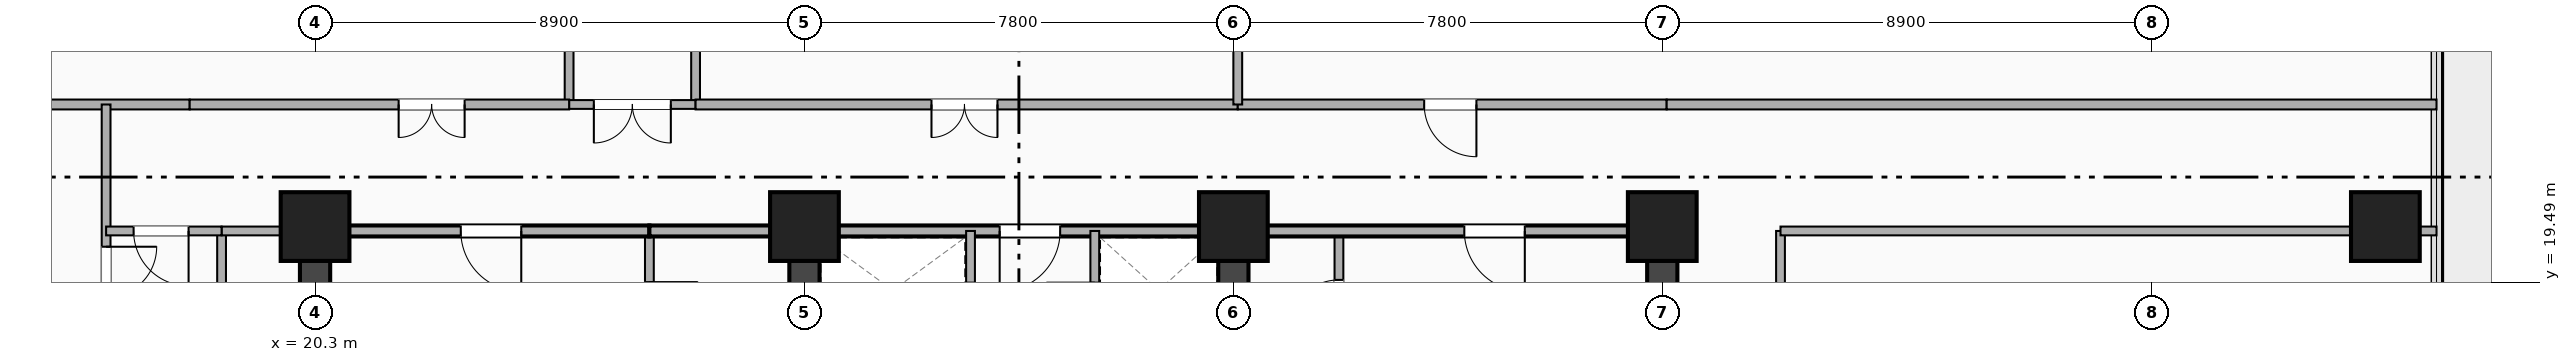
"""IFC4 building model, lengths in metres.
Left out: names, types, materials, properties, quantities, classifications, styles, units other than length and angle.
Written with IfcOpenShell. Run it as: python <this file> out.ifc"""

import sys

from ifc_helpers import new_model, si_unit, direction, frame, frame_2d, origin, origin_2d, place, context, subcontext, project, spatial, rectangle, extrude, element, fill, save


model = new_model("IFC4")
c1 = context("Model", 3, precision=1e-05, world=origin(), true_north=direction((0.0, 1.0)))
c2 = subcontext(c1, "Body", "Model", "MODEL_VIEW")
j1 = project(units=[si_unit("LENGTHUNIT", "METRE"), si_unit("PLANEANGLEUNIT", "RADIAN")], contexts=[c1])
p1 = place(None, origin())
s1 = spatial("IfcSite", under=j1, at=p1, CompositionType="ELEMENT")
p2 = place(p1, origin())
s2 = spatial("IfcBuilding", under=s1, at=p2, CompositionType="ELEMENT")
p3 = place(p2, frame((0.0, 0.0, 83.8)))
s3 = spatial("IfcBuildingStorey", under=s2, at=p3, CompositionType="ELEMENT", Elevation=83.8)
for number, where, z_axis, x_axis in (
    (1, (20.3, 3.5, 0.0), (0.0, 0.0, 1.0), (0.0, 1.0, 0.0)),
    (2, (44.8, 3.5, 0.0), (0.0, 0.0, 1.0), (0.0, 1.0, 0.0)),
):
    element("IfcWall", number, at=place(p3, frame(where, z_axis=z_axis, x_axis=x_axis)), inside=s3, PredefinedType="SHEAR", context=c2, shape_type="SweptSolid", body=[
        extrude(rectangle(XDim=16.9, YDim=0.55, at=frame_2d((8.45, 0.0))), origin(), (0.0, 0.0, 1.0), 4.14),
    ])
p4 = place(p3, frame((29.2, 3.5, 0.0), z_axis=(0.0, 0.0, 1.0), x_axis=(0.0, 1.0, 0.0)))
e3 = element("IfcWall", 3, at=p4, inside=s3, PredefinedType="SHEAR", context=c2, shape_type="SweptSolid", body=[
    extrude(rectangle(XDim=16.9, YDim=0.55, at=frame_2d((8.45, 0.0))), origin(), (0.0, 0.0, 1.0), 4.14),
])
p5 = place(p4, frame((7.75, 0.0, 0.0), z_axis=(0.0, 0.0, 1.0), x_axis=(-1.0, 0.0, 0.0)))
e4 = element("IfcOpeningElement", 4, at=p5, cuts=e3, PredefinedType="OPENING", context=c2, shape_type="SweptSolid", body=[
    extrude(rectangle(XDim=1.1, YDim=2.15, at=frame_2d((0.55, 1.075))), frame((0.0, 0.285, 0.0), z_axis=(0.0, -1.0, 0.0), x_axis=(1.0, 0.0, 0.0)), (0.0, 0.0, 1.0), 0.57),
])
p6 = place(p3, frame((37.0, 3.5, 0.0), z_axis=(0.0, 0.0, 1.0), x_axis=(0.0, 1.0, 0.0)))
e5 = element("IfcWall", 5, at=p6, inside=s3, PredefinedType="SHEAR", context=c2, shape_type="SweptSolid", body=[
    extrude(rectangle(XDim=16.9, YDim=0.55, at=frame_2d((8.45, 0.0))), origin(), (0.0, 0.0, 1.0), 4.14),
])
p7 = place(p6, frame((6.65, 0.0, 0.0)))
e6 = element("IfcOpeningElement", 6, at=p7, cuts=e5, PredefinedType="OPENING", context=c2, shape_type="SweptSolid", body=[
    extrude(rectangle(XDim=1.1, YDim=2.15, at=frame_2d((0.55, 1.075))), frame((0.0, 0.285, 0.0), z_axis=(0.0, -1.0, 0.0), x_axis=(1.0, 0.0, 0.0)), (0.0, 0.0, 1.0), 0.57),
])
for number, where, z_axis, x_axis in (
    (7, (20.3, 20.5, -0.26), (0.0, 0.0, 1.0), (1.0, 0.0, 0.0)),
    (8, (29.2, 20.5, -0.26), (0.0, 0.0, 1.0), (1.0, 0.0, 0.0)),
    (9, (37.0, 20.5, -0.26), (0.0, 0.0, 1.0), (1.0, 0.0, 0.0)),
    (10, (44.8, 20.5, -0.26), (0.0, 0.0, 1.0), (1.0, 0.0, 0.0)),
    (11, (57.95, 20.5, -0.26), (0.0, 0.0, 1.0), (1.0, 0.0, 0.0)),
):
    element("IfcColumn", number, at=place(p3, frame(where, z_axis=z_axis, x_axis=x_axis)), inside=s3, PredefinedType="COLUMN", context=c2, shape_type="SweptSolid", body=[
        extrude(rectangle(XDim=1.25, YDim=1.25, at=origin_2d()), origin(), (0.0, 0.0, 1.0), 4.4),
    ])
p8 = place(p3, frame((26.38, 17.76, 0.0), z_axis=(0.0, 0.0, 1.0), x_axis=(0.0, 1.0, 0.0)))
e12 = element("IfcWall", 12, at=p8, inside=s3, PredefinedType="PARTITIONING", context=c2, shape_type="SweptSolid", body=[
    extrude(rectangle(XDim=2.66, YDim=0.16, at=frame_2d((1.33, 0.0))), origin(), (0.0, 0.0, 1.0), 3.514),
])
p9 = place(p8, frame((0.85, 0.0, 0.0)))
e13 = element("IfcOpeningElement", 13, at=p9, cuts=e12, PredefinedType="OPENING", context=c2, shape_type="SweptSolid", body=[
    extrude(rectangle(XDim=0.88, YDim=2.08, at=frame_2d((0.44, 1.04))), frame((0.0, 0.09, 0.0), z_axis=(0.0, -1.0, 0.0), x_axis=(1.0, 0.0, 0.0)), (0.0, 0.0, 1.0), 0.18),
])
p10 = place(p3, frame((38.92, 17.76, 0.0), z_axis=(0.0, 0.0, 1.0), x_axis=(0.0, 1.0, 0.0)))
e14 = element("IfcWall", 14, at=p10, inside=s3, PredefinedType="PARTITIONING", context=c2, shape_type="SweptSolid", body=[
    extrude(rectangle(XDim=2.66, YDim=0.16, at=frame_2d((1.33, 0.0))), origin(), (0.0, 0.0, 1.0), 3.514),
])
p11 = place(p10, frame((1.77, 0.0, 0.0), z_axis=(0.0, 0.0, 1.0), x_axis=(-1.0, 0.0, 0.0)))
e15 = element("IfcOpeningElement", 15, at=p11, cuts=e14, PredefinedType="OPENING", context=c2, shape_type="SweptSolid", body=[
    extrude(rectangle(XDim=0.92, YDim=2.08, at=frame_2d((0.46, 1.04))), frame((0.0, 0.09, 0.0), z_axis=(0.0, -1.0, 0.0), x_axis=(1.0, 0.0, 0.0)), (0.0, 0.0, 1.0), 0.18),
])
p12 = place(p3, frame((20.65, 20.42, 0.0), z_axis=(0.0, 0.0, 1.0), x_axis=(1.0, 0.0, 0.0)))
e16 = element("IfcWall", 16, at=p12, inside=s3, PredefinedType="PARTITIONING", context=c2, shape_type="SweptSolid", body=[
    extrude(rectangle(XDim=5.73, YDim=0.2, at=frame_2d((2.865, 0.0))), origin(), (0.0, 0.0, 1.0), 3.213),
])
p13 = place(p12, frame((2.3, 0.0, 0.0)))
e17 = element("IfcOpeningElement", 17, at=p13, cuts=e16, PredefinedType="OPENING", context=c2, shape_type="SweptSolid", body=[
    extrude(rectangle(XDim=1.1, YDim=2.15, at=frame_2d((0.55, 1.075))), frame((0.0, 0.11, 0.0), z_axis=(0.0, -1.0, 0.0), x_axis=(1.0, 0.0, 0.0)), (0.0, 0.0, 1.0), 0.22),
])
p14 = place(p3, frame((26.38, 20.42, 0.0), z_axis=(0.0, 0.0, 1.0), x_axis=(1.0, 0.0, 0.0)))
e18 = element("IfcWall", 18, at=p14, inside=s3, PredefinedType="PARTITIONING", context=c2, shape_type="SweptSolid", body=[
    extrude(rectangle(XDim=2.82, YDim=0.2, at=frame_2d((1.41, 0.0))), origin(), (0.0, 0.0, 1.0), 3.213),
])
p15 = place(p3, frame((29.2, 20.42, 0.0), z_axis=(0.0, 0.0, 1.0), x_axis=(1.0, 0.0, 0.0)))
e19 = element("IfcWall", 19, at=p15, inside=s3, PredefinedType="PARTITIONING", context=c2, shape_type="SweptSolid", body=[
    extrude(rectangle(XDim=7.8, YDim=0.2, at=frame_2d((3.9, 0.0))), origin(), (0.0, 0.0, 1.0), 3.213),
])
p16 = place(p15, frame((3.55, 0.0, 0.0)))
e20 = element("IfcOpeningElement", 20, at=p16, cuts=e19, PredefinedType="OPENING", context=c2, shape_type="SweptSolid", body=[
    extrude(rectangle(XDim=1.1, YDim=2.15, at=frame_2d((0.55, 1.075))), frame((0.0, 0.11, 0.0), z_axis=(0.0, -1.0, 0.0), x_axis=(1.0, 0.0, 0.0)), (0.0, 0.0, 1.0), 0.22),
])
p17 = place(p3, frame((37.0, 20.42, 0.0), z_axis=(0.0, 0.0, 1.0), x_axis=(1.0, 0.0, 0.0)))
e21 = element("IfcWall", 21, at=p17, inside=s3, PredefinedType="PARTITIONING", context=c2, shape_type="SweptSolid", body=[
    extrude(rectangle(XDim=7.45, YDim=0.2, at=frame_2d((3.725, 0.0))), origin(), (0.0, 0.0, 1.0), 3.213),
])
p18 = place(p17, frame((4.2, 0.0, 0.0)))
e22 = element("IfcOpeningElement", 22, at=p18, cuts=e21, PredefinedType="OPENING", context=c2, shape_type="SweptSolid", body=[
    extrude(rectangle(XDim=1.1, YDim=2.15, at=frame_2d((0.55, 1.075))), frame((0.0, 0.11, 0.0), z_axis=(0.0, -1.0, 0.0), x_axis=(1.0, 0.0, 0.0)), (0.0, 0.0, 1.0), 0.22),
])
p19 = place(p3, frame((32.22, 12.5, 0.0), z_axis=(0.0, 0.0, 1.0), x_axis=(0.0, 1.0, 0.0)))
e23 = element("IfcWall", 23, at=p19, inside=s3, PredefinedType="PARTITIONING", context=c2, shape_type="SweptSolid", body=[
    extrude(rectangle(XDim=7.92, YDim=0.16, at=frame_2d((3.96, 0.0))), origin(), (0.0, 0.0, 1.0), 3.514),
])
p20 = place(p19, frame((1.43, 0.0, 0.0), z_axis=(0.0, 0.0, 1.0), x_axis=(-1.0, 0.0, 0.0)))
e24 = element("IfcOpeningElement", 24, at=p20, cuts=e23, PredefinedType="OPENING", context=c2, shape_type="SweptSolid", body=[
    extrude(rectangle(XDim=1.08, YDim=2.16, at=frame_2d((0.54, 1.08))), frame((0.0, 0.09, 0.0), z_axis=(0.0, -1.0, 0.0), x_axis=(1.0, 0.0, 0.0)), (0.0, 0.0, 1.0), 0.18),
])
p21 = place(p19, frame((4.33, 0.0, 0.0), z_axis=(0.0, 0.0, 1.0), x_axis=(-1.0, 0.0, 0.0)))
e25 = element("IfcOpeningElement", 25, at=p21, cuts=e23, PredefinedType="OPENING", context=c2, shape_type="SweptSolid", body=[
    extrude(rectangle(XDim=1.08, YDim=2.16, at=frame_2d((0.54, 1.08))), frame((0.0, 0.09, 0.0), z_axis=(0.0, -1.0, 0.0), x_axis=(1.0, 0.0, 0.0)), (0.0, 0.0, 1.0), 0.18),
])
p22 = place(p19, frame((6.1, 0.0, 0.0)))
e26 = element("IfcOpeningElement", 26, at=p22, cuts=e23, PredefinedType="OPENING", context=c2, shape_type="SweptSolid", body=[
    extrude(rectangle(XDim=0.88, YDim=2.08, at=frame_2d((0.44, 1.04))), frame((0.0, 0.09, 0.0), z_axis=(0.0, -1.0, 0.0), x_axis=(1.0, 0.0, 0.0)), (0.0, 0.0, 1.0), 0.18),
])
p23 = place(p3, frame((34.48, 12.5, 0.0), z_axis=(0.0, 0.0, 1.0), x_axis=(0.0, 1.0, 0.0)))
e27 = element("IfcWall", 27, at=p23, inside=s3, PredefinedType="PARTITIONING", context=c2, shape_type="SweptSolid", body=[
    extrude(rectangle(XDim=7.92, YDim=0.16, at=frame_2d((3.96, 0.0))), origin(), (0.0, 0.0, 1.0), 3.514),
])
p24 = place(p23, frame((0.35, 0.0, 0.0)))
e28 = element("IfcOpeningElement", 28, at=p24, cuts=e27, PredefinedType="OPENING", context=c2, shape_type="SweptSolid", body=[
    extrude(rectangle(XDim=1.08, YDim=2.16, at=frame_2d((0.54, 1.08))), frame((0.0, 0.09, 0.0), z_axis=(0.0, -1.0, 0.0), x_axis=(1.0, 0.0, 0.0)), (0.0, 0.0, 1.0), 0.18),
])
p25 = place(p23, frame((3.25, 0.0, 0.0)))
e29 = element("IfcOpeningElement", 29, at=p25, cuts=e27, PredefinedType="OPENING", context=c2, shape_type="SweptSolid", body=[
    extrude(rectangle(XDim=1.08, YDim=2.16, at=frame_2d((0.54, 1.08))), frame((0.0, 0.09, 0.0), z_axis=(0.0, -1.0, 0.0), x_axis=(1.0, 0.0, 0.0)), (0.0, 0.0, 1.0), 0.18),
])
p26 = place(p23, frame((6.98, 0.0, 0.0), z_axis=(0.0, 0.0, 1.0), x_axis=(-1.0, 0.0, 0.0)))
e30 = element("IfcOpeningElement", 30, at=p26, cuts=e27, PredefinedType="OPENING", context=c2, shape_type="SweptSolid", body=[
    extrude(rectangle(XDim=0.88, YDim=2.08, at=frame_2d((0.44, 1.04))), frame((0.0, 0.09, 0.0), z_axis=(0.0, -1.0, 0.0), x_axis=(1.0, 0.0, 0.0)), (0.0, 0.0, 1.0), 0.18),
])
p27 = place(p3, frame((11.47, 22.72, 0.0), z_axis=(0.0, 0.0, 1.0), x_axis=(1.0, 0.0, 0.0)))
e31 = element("IfcWall", 31, at=p27, inside=s3, PredefinedType="PARTITIONING", context=c2, shape_type="SweptSolid", body=[
    extrude(rectangle(XDim=6.55, YDim=0.18, at=frame_2d((3.275, 0.0))), origin(), (0.0, 0.0, 1.0), 3.503),
])
p28 = place(p3, frame((16.5, 18.52, 0.0), z_axis=(0.0, 0.0, 1.0), x_axis=(0.0, 1.0, 0.0)))
e32 = element("IfcWall", 32, at=p28, inside=s3, PredefinedType="PARTITIONING", context=c2, shape_type="SweptSolid", body=[
    extrude(rectangle(XDim=4.2, YDim=0.16, at=frame_2d((2.1, 0.0))), origin(), (0.0, 0.0, 1.0), 3.213),
])
p29 = place(p28, frame((0.693, 0.0, 0.0)))
e33 = element("IfcOpeningElement", 33, at=p29, cuts=e32, PredefinedType="OPENING", context=c2, shape_type="SweptSolid", body=[
    extrude(rectangle(XDim=0.92, YDim=2.08, at=frame_2d((0.46, 1.04))), frame((0.0, 0.09, 0.0), z_axis=(0.0, -1.0, 0.0), x_axis=(1.0, 0.0, 0.0)), (0.0, 0.0, 1.0), 0.18),
])
p30 = place(p3, frame((18.6, 10.55, 0.0), z_axis=(0.0, 0.0, 1.0), x_axis=(0.0, 1.0, 0.0)))
e34 = element("IfcWall", 34, at=p30, inside=s3, PredefinedType="PARTITIONING", context=c2, shape_type="SweptSolid", body=[
    extrude(rectangle(XDim=9.87, YDim=0.16, at=frame_2d((4.935, 0.0))), origin(), (0.0, 0.0, 1.0), 3.213),
])
p31 = place(p30, frame((5.08, 0.0, 0.0), z_axis=(0.0, 0.0, 1.0), x_axis=(-1.0, 0.0, 0.0)))
e35 = element("IfcOpeningElement", 35, at=p31, cuts=e34, PredefinedType="OPENING", context=c2, shape_type="SweptSolid", body=[
    extrude(rectangle(XDim=0.88, YDim=2.08, at=frame_2d((0.44, 1.04))), frame((0.0, 0.09, 0.0), z_axis=(0.0, -1.0, 0.0), x_axis=(1.0, 0.0, 0.0)), (0.0, 0.0, 1.0), 0.18),
])
p32 = place(p3, frame((18.6, 20.42, 0.0), z_axis=(0.0, 0.0, 1.0), x_axis=(1.0, 0.0, 0.0)))
e36 = element("IfcWall", 36, at=p32, inside=s3, PredefinedType="PARTITIONING", context=c2, shape_type="SweptSolid", body=[
    extrude(rectangle(XDim=1.7, YDim=0.16, at=frame_2d((0.85, 0.0))), origin(), (0.0, 0.0, 1.0), 3.213),
])
p33 = place(p3, frame((16.5, 20.42, 0.0), z_axis=(0.0, 0.0, 1.0), x_axis=(1.0, 0.0, 0.0)))
e37 = element("IfcWall", 37, at=p33, inside=s3, PredefinedType="PARTITIONING", context=c2, shape_type="SweptSolid", body=[
    extrude(rectangle(XDim=2.1, YDim=0.16, at=frame_2d((1.05, 0.0))), origin(), (0.0, 0.0, 1.0), 3.213),
])
p34 = place(p33, frame((0.5, 0.0, 0.0)))
e38 = element("IfcOpeningElement", 38, at=p34, cuts=e37, PredefinedType="OPENING", context=c2, shape_type="SweptSolid", body=[
    extrude(rectangle(XDim=1.0, YDim=2.15, at=frame_2d((0.5, 1.075))), frame((0.0, 0.09, 0.0), z_axis=(0.0, -1.0, 0.0), x_axis=(1.0, 0.0, 0.0)), (0.0, 0.0, 1.0), 0.18),
])
p35 = place(p3, frame((46.95, 16.88, 0.0), z_axis=(0.0, 0.0, 1.0), x_axis=(0.0, 1.0, 0.0)))
e39 = element("IfcWall", 39, at=p35, inside=s3, PredefinedType="PARTITIONING", context=c2, shape_type="SweptSolid", body=[
    extrude(rectangle(XDim=3.54, YDim=0.16, at=frame_2d((1.77, 0.0))), origin(), (0.0, 0.0, 1.0), 3.213),
])
p36 = place(p35, frame((2.03, 0.0, 0.0), z_axis=(0.0, 0.0, 1.0), x_axis=(-1.0, 0.0, 0.0)))
e40 = element("IfcOpeningElement", 40, at=p36, cuts=e39, PredefinedType="OPENING", context=c2, shape_type="SweptSolid", body=[
    extrude(rectangle(XDim=0.88, YDim=2.08, at=frame_2d((0.44, 1.04))), frame((0.0, 0.09, 0.0), z_axis=(0.0, -1.0, 0.0), x_axis=(1.0, 0.0, 0.0)), (0.0, 0.0, 1.0), 0.18),
])
p37 = place(p3, frame((46.95, 20.42, 0.0), z_axis=(0.0, 0.0, 1.0), x_axis=(1.0, 0.0, 0.0)))
e41 = element("IfcWall", 41, at=p37, inside=s3, PredefinedType="PARTITIONING", context=c2, shape_type="SweptSolid", body=[
    extrude(rectangle(XDim=11.93, YDim=0.16, at=frame_2d((5.965, 0.0))), origin(), (0.0, 0.0, 1.0), 3.213),
])
for number, where, z_axis, x_axis in (
    (42, (24.92, 22.72, 0.0), (0.0, 0.0, 1.0), (0.0, 1.0, 0.0)),
    (43, (27.22, 22.72, 0.0), (0.0, 0.0, 1.0), (0.0, 1.0, 0.0)),
):
    element("IfcWall", number, at=place(p3, frame(where, z_axis=z_axis, x_axis=x_axis)), inside=s3, PredefinedType="PARTITIONING", context=c2, shape_type="SweptSolid", body=[
        extrude(rectangle(XDim=8.4, YDim=0.16, at=frame_2d((4.2, 0.0))), origin(), (0.0, 0.0, 1.0), 3.718),
    ])
p38 = place(p3, frame((24.92, 22.72, 0.0), z_axis=(0.0, 0.0, 1.0), x_axis=(1.0, 0.0, 0.0)))
e44 = element("IfcWall", 44, at=p38, inside=s3, PredefinedType="PARTITIONING", context=c2, shape_type="SweptSolid", body=[
    extrude(rectangle(XDim=2.3, YDim=0.16, at=frame_2d((1.15, 0.0))), origin(), (0.0, 0.0, 1.0), 4.14),
])
p39 = place(p38, frame((0.45, 0.0, 0.0)))
e45 = element("IfcOpeningElement", 45, at=p39, cuts=e44, PredefinedType="OPENING", context=c2, shape_type="SweptSolid", body=[
    extrude(rectangle(XDim=1.4, YDim=2.2, at=frame_2d((0.7, 1.1))), frame((0.0, 0.09, 0.0), z_axis=(0.0, -1.0, 0.0), x_axis=(1.0, 0.0, 0.0)), (0.0, 0.0, 1.0), 0.18),
])
p40 = place(p3, frame((18.02, 22.72, 0.0), z_axis=(0.0, 0.0, 1.0), x_axis=(1.0, 0.0, 0.0)))
e46 = element("IfcWall", 46, at=p40, inside=s3, PredefinedType="PARTITIONING", context=c2, shape_type="SweptSolid", body=[
    extrude(rectangle(XDim=6.9, YDim=0.18, at=frame_2d((3.45, 0.0))), origin(), (0.0, 0.0, 1.0), 3.213),
])
p41 = place(p40, frame((3.8, 0.0, 0.0)))
e47 = element("IfcOpeningElement", 47, at=p41, cuts=e46, PredefinedType="OPENING", context=c2, shape_type="SweptSolid", body=[
    extrude(rectangle(XDim=1.2, YDim=2.14, at=frame_2d((0.6, 1.07))), frame((0.0, 0.1, 0.0), z_axis=(0.0, -1.0, 0.0), x_axis=(1.0, 0.0, 0.0)), (0.0, 0.0, 1.0), 0.2),
])
p42 = place(p3, frame((27.22, 22.72, 0.0), z_axis=(0.0, 0.0, 1.0), x_axis=(1.0, 0.0, 0.0)))
e48 = element("IfcWall", 48, at=p42, inside=s3, PredefinedType="PARTITIONING", context=c2, shape_type="SweptSolid", body=[
    extrude(rectangle(XDim=9.86, YDim=0.18, at=frame_2d((4.93, 0.0))), origin(), (0.0, 0.0, 1.0), 3.213),
])
p43 = place(p42, frame((4.29, 0.0, 0.0)))
e49 = element("IfcOpeningElement", 49, at=p43, cuts=e48, PredefinedType="OPENING", context=c2, shape_type="SweptSolid", body=[
    extrude(rectangle(XDim=1.2, YDim=2.14, at=frame_2d((0.6, 1.07))), frame((0.0, 0.1, 0.0), z_axis=(0.0, -1.0, 0.0), x_axis=(1.0, 0.0, 0.0)), (0.0, 0.0, 1.0), 0.2),
])
p44 = place(p3, frame((37.08, 22.72, 0.0), z_axis=(0.0, 0.0, 1.0), x_axis=(1.0, 0.0, 0.0)))
e50 = element("IfcWall", 50, at=p44, inside=s3, PredefinedType="PARTITIONING", context=c2, shape_type="SweptSolid", body=[
    extrude(rectangle(XDim=7.8, YDim=0.18, at=frame_2d((3.9, 0.0))), origin(), (0.0, 0.0, 1.0), 3.213),
])
p45 = place(p44, frame((3.39, 0.0, 0.0)))
e51 = element("IfcOpeningElement", 51, at=p45, cuts=e50, PredefinedType="OPENING", context=c2, shape_type="SweptSolid", body=[
    extrude(rectangle(XDim=0.95, YDim=2.15, at=frame_2d((0.475, 1.075))), frame((0.0, 0.1, 0.0), z_axis=(0.0, -1.0, 0.0), x_axis=(1.0, 0.0, 0.0)), (0.0, 0.0, 1.0), 0.2),
])
p46 = place(p3, frame((44.88, 22.72, 0.0), z_axis=(0.0, 0.0, 1.0), x_axis=(1.0, 0.0, 0.0)))
e52 = element("IfcWall", 52, at=p46, inside=s3, PredefinedType="PARTITIONING", context=c2, shape_type="SweptSolid", body=[
    extrude(rectangle(XDim=14.0, YDim=0.18, at=frame_2d((7.0, 0.0))), origin(), (0.0, 0.0, 1.0), 3.213),
])
p47 = place(p3, frame((37.08, 22.72, 0.0), z_axis=(0.0, 0.0, 1.0), x_axis=(0.0, 1.0, 0.0)))
e53 = element("IfcWall", 53, at=p47, inside=s3, PredefinedType="PARTITIONING", context=c2, shape_type="SweptSolid", body=[
    extrude(rectangle(XDim=8.4, YDim=0.16, at=frame_2d((4.2, 0.0))), origin(), (0.0, 0.0, 1.0), 3.213),
])
p48 = place(p11, origin())
e54 = element("IfcDoor", 54, at=p48, inside=s3, OperationType="SINGLE_SWING_LEFT", PredefinedType="DOOR", context=c2, shape_type="SweptSolid", body=[
    extrude(rectangle(XDim=0.92, YDim=2.08, at=frame_2d((0.46, 1.04))), frame((0.0, 0.025, 0.0), z_axis=(0.0, -1.0, 0.0), x_axis=(1.0, 0.0, 0.0)), (0.0, 0.0, 1.0), 0.05),
])
fill(e15, e54)
p49 = place(p13, origin())
e55 = element("IfcDoor", 55, at=p49, inside=s3, OperationType="SINGLE_SWING_RIGHT", PredefinedType="DOOR", context=c2, shape_type="SweptSolid", body=[
    extrude(rectangle(XDim=1.1, YDim=2.15, at=frame_2d((0.55, 1.075))), frame((0.0, 0.025, 0.0), z_axis=(0.0, -1.0, 0.0), x_axis=(1.0, 0.0, 0.0)), (0.0, 0.0, 1.0), 0.05),
])
fill(e17, e55)
p50 = place(p16, origin())
e56 = element("IfcDoor", 56, at=p50, inside=s3, OperationType="SINGLE_SWING_LEFT", PredefinedType="DOOR", context=c2, shape_type="SweptSolid", body=[
    extrude(rectangle(XDim=1.1, YDim=2.15, at=frame_2d((0.55, 1.075))), frame((0.0, 0.025, 0.0), z_axis=(0.0, -1.0, 0.0), x_axis=(1.0, 0.0, 0.0)), (0.0, 0.0, 1.0), 0.05),
])
fill(e20, e56)
p51 = place(p18, origin())
e57 = element("IfcDoor", 57, at=p51, inside=s3, OperationType="SINGLE_SWING_RIGHT", PredefinedType="DOOR", context=c2, shape_type="SweptSolid", body=[
    extrude(rectangle(XDim=1.1, YDim=2.15, at=frame_2d((0.55, 1.075))), frame((0.0, 0.025, 0.0), z_axis=(0.0, -1.0, 0.0), x_axis=(1.0, 0.0, 0.0)), (0.0, 0.0, 1.0), 0.05),
])
fill(e22, e57)
p52 = place(p29, origin())
e58 = element("IfcDoor", 58, at=p52, inside=s3, OperationType="SINGLE_SWING_RIGHT", PredefinedType="DOOR", context=c2, shape_type="SweptSolid", body=[
    extrude(rectangle(XDim=0.92, YDim=2.08, at=frame_2d((0.46, 1.04))), frame((0.0, 0.025, 0.0), z_axis=(0.0, -1.0, 0.0), x_axis=(1.0, 0.0, 0.0)), (0.0, 0.0, 1.0), 0.05),
])
fill(e33, e58)
p53 = place(p34, origin())
e59 = element("IfcDoor", 59, at=p53, inside=s3, OperationType="SINGLE_SWING_RIGHT", PredefinedType="DOOR", context=c2, shape_type="SweptSolid", body=[
    extrude(rectangle(XDim=1.0, YDim=2.15, at=frame_2d((0.5, 1.075))), frame((0.0, 0.025, 0.0), z_axis=(0.0, -1.0, 0.0), x_axis=(1.0, 0.0, 0.0)), (0.0, 0.0, 1.0), 0.05),
])
fill(e38, e59)
p54 = place(p39, origin())
e60 = element("IfcDoor", 60, at=p54, inside=s3, OperationType="DOUBLE_DOOR_SINGLE_SWING", PredefinedType="DOOR", context=c2, shape_type="SweptSolid", body=[
    extrude(rectangle(XDim=1.4, YDim=2.2, at=frame_2d((0.7, 1.1))), frame((0.0, 0.025, 0.0), z_axis=(0.0, -1.0, 0.0), x_axis=(1.0, 0.0, 0.0)), (0.0, 0.0, 1.0), 0.05),
])
fill(e45, e60)
p55 = place(p41, origin())
e61 = element("IfcDoor", 61, at=p55, inside=s3, OperationType="DOUBLE_DOOR_SINGLE_SWING", PredefinedType="DOOR", context=c2, shape_type="SweptSolid", body=[
    extrude(rectangle(XDim=1.2, YDim=2.14, at=frame_2d((0.6, 1.07))), frame((0.0, 0.025, 0.0), z_axis=(0.0, -1.0, 0.0), x_axis=(1.0, 0.0, 0.0)), (0.0, 0.0, 1.0), 0.05),
])
fill(e47, e61)
p56 = place(p43, origin())
e62 = element("IfcDoor", 62, at=p56, inside=s3, OperationType="DOUBLE_DOOR_SINGLE_SWING", PredefinedType="DOOR", context=c2, shape_type="SweptSolid", body=[
    extrude(rectangle(XDim=1.2, YDim=2.14, at=frame_2d((0.6, 1.07))), frame((0.0, 0.025, 0.0), z_axis=(0.0, -1.0, 0.0), x_axis=(1.0, 0.0, 0.0)), (0.0, 0.0, 1.0), 0.05),
])
fill(e49, e62)
p57 = place(p45, origin())
e63 = element("IfcDoor", 63, at=p57, inside=s3, OperationType="SINGLE_SWING_RIGHT", PredefinedType="DOOR", context=c2, shape_type="SweptSolid", body=[
    extrude(rectangle(XDim=0.95, YDim=2.15, at=frame_2d((0.475, 1.075))), frame((0.0, 0.025, 0.0), z_axis=(0.0, -1.0, 0.0), x_axis=(1.0, 0.0, 0.0)), (0.0, 0.0, 1.0), 0.05),
])
fill(e51, e63)
save(model, sys.argv[1])
